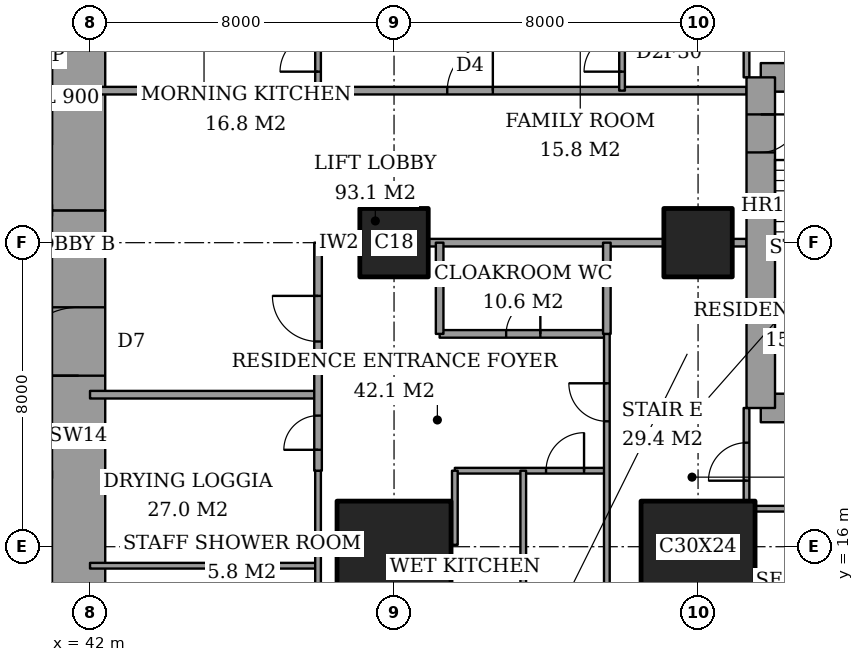
"""IFC4 building model, lengths in metres.
Left out: names, types, materials, properties, quantities, classifications, styles, units other than length and angle.
Written with IfcOpenShell. Run it as: python <this file> out.ifc"""

import sys

from ifc_helpers import new_model, si_unit, direction, frame, frame_2d, origin, origin_2d, place, context, subcontext, project, spatial, rectangle, extrude, element, fill, save


model = new_model("IFC4")
c1 = context("Model", 3, precision=1e-05, world=origin(), true_north=direction((0.0, 1.0)))
c2 = subcontext(c1, "Body", "Model", "MODEL_VIEW")
j1 = project(units=[si_unit("LENGTHUNIT", "METRE"), si_unit("PLANEANGLEUNIT", "RADIAN")], contexts=[c1])
p1 = place(None, origin())
s1 = spatial("IfcSite", under=j1, at=p1, CompositionType="ELEMENT")
p2 = place(p1, origin())
s2 = spatial("IfcBuilding", under=s1, at=p2, CompositionType="ELEMENT")
p3 = place(p2, frame((0.0, 0.0, 203.8)))
s3 = spatial("IfcBuildingStorey", under=s2, at=p3, CompositionType="ELEMENT", Elevation=203.8)
p4 = place(p3, frame((50.0, 16.0, 0.0), z_axis=(0.0, 0.0, 1.0), x_axis=(1.0, 0.0, 0.0)))
e1 = element("IfcColumn", 1, at=p4, inside=s3, PredefinedType="COLUMN", context=c2, shape_type="SweptSolid", body=[
    extrude(rectangle(XDim=3.0, YDim=2.4, at=origin_2d()), origin(), (0.0, 0.0, 1.0), 3.6),
])
p5 = place(p3, frame((50.0, 24.0, 0.0), z_axis=(0.0, 0.0, 1.0), x_axis=(1.0, 0.0, 0.0)))
e2 = element("IfcColumn", 2, at=p5, inside=s3, PredefinedType="COLUMN", context=c2, shape_type="SweptSolid", body=[
    extrude(rectangle(XDim=1.8, YDim=1.8, at=origin_2d()), origin(), (0.0, 0.0, 1.0), 3.6),
])
p6 = place(p3, frame((58.0, 16.0, 0.0), z_axis=(0.0, 0.0, 1.0), x_axis=(1.0, 0.0, 0.0)))
e3 = element("IfcColumn", 3, at=p6, inside=s3, PredefinedType="COLUMN", context=c2, shape_type="SweptSolid", body=[
    extrude(rectangle(XDim=3.0, YDim=2.4, at=origin_2d()), origin(), (0.0, 0.0, 1.0), 3.6),
])
p7 = place(p3, frame((58.0, 24.0, 0.0), z_axis=(0.0, 0.0, 1.0), x_axis=(1.0, 0.0, 0.0)))
e4 = element("IfcColumn", 4, at=p7, inside=s3, PredefinedType="COLUMN", context=c2, shape_type="SweptSolid", body=[
    extrude(rectangle(XDim=1.8, YDim=1.8, at=origin_2d()), origin(), (0.0, 0.0, 1.0), 3.6),
])
p8 = place(p3, frame((41.7, 13.0, 0.0), z_axis=(0.0, 0.0, 1.0), x_axis=(0.0, 1.0, 0.0)))
e5 = element("IfcWall", 5, at=p8, inside=s3, PredefinedType="SHEAR", context=c2, shape_type="SweptSolid", body=[
    extrude(rectangle(XDim=11.85, YDim=1.4, at=frame_2d((5.925, 0.0))), origin(), (0.0, 0.0, 1.0), 3.6),
])
p9 = place(p8, frame((7.5, 0.0, 0.0)))
e6 = element("IfcOpeningElement", 6, at=p9, cuts=e5, PredefinedType="OPENING", context=c2, shape_type="SweptSolid", body=[
    extrude(rectangle(XDim=1.8, YDim=2.4, at=frame_2d((0.9, 1.2))), frame((0.0, 0.71, 0.0), z_axis=(0.0, -1.0, 0.0), x_axis=(1.0, 0.0, 0.0)), (0.0, 0.0, 1.0), 1.42),
])
p10 = place(p3, frame((41.7, 24.85, 0.0), z_axis=(0.0, 0.0, 1.0), x_axis=(0.0, 1.0, 0.0)))
e7 = element("IfcWall", 7, at=p10, inside=s3, PredefinedType="SHEAR", context=c2, shape_type="SweptSolid", body=[
    extrude(rectangle(XDim=10.15, YDim=1.4, at=frame_2d((5.075, 0.0))), origin(), (0.0, 0.0, 1.0), 3.6),
])
for number, where, z_axis, x_axis in (
    (8, (59.65, 19.65, 0.0), (0.0, 0.0, 1.0), (1.0, 0.0, 0.0)),
    (9, (64.1, 28.35, 0.0), (0.0, 0.0, 1.0), (-1.0, 0.0, 0.0)),
):
    element("IfcWall", number, at=place(p3, frame(where, z_axis=z_axis, x_axis=x_axis)), inside=s3, PredefinedType="SHEAR", context=c2, shape_type="SweptSolid", body=[
        extrude(rectangle(XDim=4.45, YDim=0.75, at=frame_2d((2.225, 0.0))), origin(), (0.0, 0.0, 1.0), 3.6),
    ])
p11 = place(p3, frame((59.65, 28.35, 0.0), z_axis=(0.0, 0.0, 1.0), x_axis=(0.0, -1.0, 0.0)))
e10 = element("IfcWall", 10, at=p11, inside=s3, PredefinedType="SHEAR", context=c2, shape_type="SweptSolid", body=[
    extrude(rectangle(XDim=8.7, YDim=0.75, at=frame_2d((4.35, 0.0))), origin(), (0.0, 0.0, 1.0), 3.6),
])
p12 = place(p11, frame((0.975, 0.0, 0.0)))
e11 = element("IfcOpeningElement", 11, at=p12, cuts=e10, PredefinedType="OPENING", context=c2, shape_type="SweptSolid", body=[
    extrude(rectangle(XDim=1.0, YDim=2.1, at=frame_2d((0.5, 1.05))), frame((0.0, 0.385, 0.0), z_axis=(0.0, -1.0, 0.0), x_axis=(1.0, 0.0, 0.0)), (0.0, 0.0, 1.0), 0.77),
])
p13 = place(p3, frame((42.0, 15.5, 0.0), z_axis=(0.0, 0.0, 1.0), x_axis=(1.0, 0.0, 0.0)))
e12 = element("IfcWall", 12, at=p13, inside=s3, PredefinedType="PARTITIONING", context=c2, shape_type="SweptSolid", body=[
    extrude(rectangle(XDim=6.0, YDim=0.15, at=frame_2d((3.0, 0.0))), origin(), (0.0, 0.0, 1.0), 3.35),
])
p14 = place(p3, frame((48.0, 16.05, 0.0), z_axis=(0.0, 0.0, 1.0), x_axis=(1.0, 0.0, 0.0)))
e13 = element("IfcWall", 13, at=p14, inside=s3, PredefinedType="PARTITIONING", context=c2, shape_type="SweptSolid", body=[
    extrude(rectangle(XDim=0.5, YDim=0.15, at=frame_2d((0.25, 0.0))), origin(), (0.0, 0.0, 1.0), 2.634),
])
p15 = place(p3, frame((59.5, 17.0, 0.0), z_axis=(0.0, 0.0, 1.0), x_axis=(1.0, 0.0, 0.0)))
e14 = element("IfcWall", 14, at=p15, inside=s3, PredefinedType="PARTITIONING", context=c2, shape_type="SweptSolid", body=[
    extrude(rectangle(XDim=6.95, YDim=0.15, at=frame_2d((3.475, 0.0))), origin(), (0.0, 0.0, 1.0), 3.35),
])
p16 = place(p3, frame((51.6, 18.0, 0.0), z_axis=(0.0, 0.0, 1.0), x_axis=(1.0, 0.0, 0.0)))
e15 = element("IfcWall", 15, at=p16, inside=s3, PredefinedType="PARTITIONING", context=c2, shape_type="SweptSolid", body=[
    extrude(rectangle(XDim=4.0, YDim=0.15, at=frame_2d((2.0, 0.0))), origin(), (0.0, 0.0, 1.0), 3.35),
])
p17 = place(p16, frame((2.4, 0.0, 0.0)))
e16 = element("IfcOpeningElement", 16, at=p17, cuts=e15, PredefinedType="OPENING", context=c2, shape_type="SweptSolid", body=[
    extrude(rectangle(XDim=1.0, YDim=2.1, at=frame_2d((0.5, 1.05))), frame((0.0, 0.085, 0.0), z_axis=(0.0, -1.0, 0.0), x_axis=(1.0, 0.0, 0.0)), (0.0, 0.0, 1.0), 0.17),
])
p18 = place(p3, frame((42.0, 20.0, 0.0), z_axis=(0.0, 0.0, 1.0), x_axis=(1.0, 0.0, 0.0)))
e17 = element("IfcWall", 17, at=p18, inside=s3, PredefinedType="PARTITIONING", context=c2, shape_type="SweptSolid", body=[
    extrude(rectangle(XDim=6.0, YDim=0.2, at=frame_2d((3.0, 0.0))), origin(), (0.0, 0.0, 1.0), 3.35),
])
p19 = place(p3, frame((51.2, 21.6, 0.0), z_axis=(0.0, 0.0, 1.0), x_axis=(1.0, 0.0, 0.0)))
e18 = element("IfcWall", 18, at=p19, inside=s3, PredefinedType="PARTITIONING", context=c2, shape_type="SweptSolid", body=[
    extrude(rectangle(XDim=4.4, YDim=0.2, at=frame_2d((2.2, 0.0))), origin(), (0.0, 0.0, 1.0), 3.35),
])
p20 = place(p19, frame((1.75, 0.0, 0.0)))
e19 = element("IfcOpeningElement", 19, at=p20, cuts=e18, PredefinedType="OPENING", context=c2, shape_type="SweptSolid", body=[
    extrude(rectangle(XDim=0.9, YDim=2.1, at=frame_2d((0.45, 1.05))), frame((0.0, 0.11, 0.0), z_axis=(0.0, -1.0, 0.0), x_axis=(1.0, 0.0, 0.0)), (0.0, 0.0, 1.0), 0.22),
])
p21 = place(p3, frame((48.0, 24.0, 0.0), z_axis=(0.0, 0.0, 1.0), x_axis=(1.0, 0.0, 0.0)))
e20 = element("IfcWall", 20, at=p21, inside=s3, PredefinedType="PARTITIONING", context=c2, shape_type="SweptSolid", body=[
    extrude(rectangle(XDim=1.1, YDim=0.2, at=frame_2d((0.55, 0.0))), origin(), (0.0, 0.0, 1.0), 3.35),
])
p22 = place(p3, frame((50.9, 24.0, 0.0), z_axis=(0.0, 0.0, 1.0), x_axis=(1.0, 0.0, 0.0)))
e21 = element("IfcWall", 21, at=p22, inside=s3, PredefinedType="PARTITIONING", context=c2, shape_type="SweptSolid", body=[
    extrude(rectangle(XDim=6.2, YDim=0.2, at=frame_2d((3.1, 0.0))), origin(), (0.0, 0.0, 1.0), 3.35),
])
p23 = place(p3, frame((58.9, 24.0, 0.0), z_axis=(0.0, 0.0, 1.0), x_axis=(1.0, 0.0, 0.0)))
e22 = element("IfcWall", 22, at=p23, inside=s3, PredefinedType="PARTITIONING", context=c2, shape_type="SweptSolid", body=[
    extrude(rectangle(XDim=0.375, YDim=0.2, at=frame_2d((0.188, 0.0))), origin(), (0.0, 0.0, 1.0), 3.35),
])
p24 = place(p3, frame((42.0, 28.0, 0.0), z_axis=(0.0, 0.0, 1.0), x_axis=(1.0, 0.0, 0.0)))
e23 = element("IfcWall", 23, at=p24, inside=s3, PredefinedType="PARTITIONING", context=c2, shape_type="SweptSolid", body=[
    extrude(rectangle(XDim=17.275, YDim=0.2, at=frame_2d((8.637, 0.0))), origin(), (0.0, 0.0, 1.0), 3.35),
])
p25 = place(p24, frame((9.4, 0.0, 0.0)))
e24 = element("IfcOpeningElement", 24, at=p25, cuts=e23, PredefinedType="OPENING", context=c2, shape_type="SweptSolid", body=[
    extrude(rectangle(XDim=1.2, YDim=2.4, at=frame_2d((0.6, 1.2))), frame((0.0, 0.11, 0.0), z_axis=(0.0, -1.0, 0.0), x_axis=(1.0, 0.0, 0.0)), (0.0, 0.0, 1.0), 0.22),
])
p26 = place(p3, frame((45.6, 13.1, 0.0), z_axis=(0.0, 0.0, 1.0), x_axis=(0.0, 1.0, 0.0)))
e25 = element("IfcWall", 25, at=p26, inside=s3, PredefinedType="PARTITIONING", context=c2, shape_type="SweptSolid", body=[
    extrude(rectangle(XDim=2.4, YDim=0.15, at=frame_2d((1.2, 0.0))), origin(), (0.0, 0.0, 1.0), 3.35),
])
p27 = place(p26, frame((0.75, 0.0, 0.0)))
e26 = element("IfcOpeningElement", 26, at=p27, cuts=e25, PredefinedType="OPENING", context=c2, shape_type="SweptSolid", body=[
    extrude(rectangle(XDim=0.9, YDim=2.1, at=frame_2d((0.45, 1.05))), frame((0.0, 0.085, 0.0), z_axis=(0.0, -1.0, 0.0), x_axis=(1.0, 0.0, 0.0)), (0.0, 0.0, 1.0), 0.17),
])
p28 = place(p3, frame((48.0, 18.0, 0.0), z_axis=(0.0, 0.0, 1.0), x_axis=(0.0, 1.0, 0.0)))
e27 = element("IfcWall", 27, at=p28, inside=s3, PredefinedType="PARTITIONING", context=c2, shape_type="SweptSolid", body=[
    extrude(rectangle(XDim=6.0, YDim=0.2, at=frame_2d((3.0, 0.0))), origin(), (0.0, 0.0, 1.0), 3.35),
])
p29 = place(p28, frame((3.4, 0.0, 0.0)))
e28 = element("IfcOpeningElement", 28, at=p29, cuts=e27, PredefinedType="OPENING", context=c2, shape_type="SweptSolid", body=[
    extrude(rectangle(XDim=1.2, YDim=2.4, at=frame_2d((0.6, 1.2))), frame((0.0, 0.11, 0.0), z_axis=(0.0, -1.0, 0.0), x_axis=(1.0, 0.0, 0.0)), (0.0, 0.0, 1.0), 0.22),
])
p30 = place(p28, frame((0.55, 0.0, 0.0)))
e29 = element("IfcOpeningElement", 29, at=p30, cuts=e27, PredefinedType="OPENING", context=c2, shape_type="SweptSolid", body=[
    extrude(rectangle(XDim=0.9, YDim=2.1, at=frame_2d((0.45, 1.05))), frame((0.0, 0.11, 0.0), z_axis=(0.0, -1.0, 0.0), x_axis=(1.0, 0.0, 0.0)), (0.0, 0.0, 1.0), 0.22),
])
p31 = place(p3, frame((48.0, 11.2, 0.0), z_axis=(0.0, 0.0, 1.0), x_axis=(0.0, 1.0, 0.0)))
e30 = element("IfcWall", 30, at=p31, inside=s3, PredefinedType="PARTITIONING", context=c2, shape_type="SweptSolid", body=[
    extrude(rectangle(XDim=6.8, YDim=0.15, at=frame_2d((3.4, 0.0))), origin(), (0.0, 0.0, 1.0), 3.35),
])
p32 = place(p3, frame((48.0, 28.0, 0.0), z_axis=(0.0, 0.0, 1.0), x_axis=(0.0, 1.0, 0.0)))
e31 = element("IfcWall", 31, at=p32, inside=s3, PredefinedType="PARTITIONING", context=c2, shape_type="SweptSolid", body=[
    extrude(rectangle(XDim=9.2, YDim=0.15, at=frame_2d((4.6, 0.0))), origin(), (0.0, 0.0, 1.0), 3.35),
])
p33 = place(p32, frame((0.5, 0.0, 0.0)))
e32 = element("IfcOpeningElement", 32, at=p33, cuts=e31, PredefinedType="OPENING", context=c2, shape_type="SweptSolid", body=[
    extrude(rectangle(XDim=1.0, YDim=2.1, at=frame_2d((0.5, 1.05))), frame((0.0, 0.085, 0.0), z_axis=(0.0, -1.0, 0.0), x_axis=(1.0, 0.0, 0.0)), (0.0, 0.0, 1.0), 0.17),
])
p34 = place(p3, frame((51.2, 21.6, 0.0), z_axis=(0.0, 0.0, 1.0), x_axis=(0.0, 1.0, 0.0)))
e33 = element("IfcWall", 33, at=p34, inside=s3, PredefinedType="PARTITIONING", context=c2, shape_type="SweptSolid", body=[
    extrude(rectangle(XDim=2.4, YDim=0.2, at=frame_2d((1.2, 0.0))), origin(), (0.0, 0.0, 1.0), 3.35),
])
p35 = place(p3, frame((51.6, 16.05, 0.0), z_axis=(0.0, 0.0, 1.0), x_axis=(0.0, 1.0, 0.0)))
e34 = element("IfcWall", 34, at=p35, inside=s3, PredefinedType="PARTITIONING", context=c2, shape_type="SweptSolid", body=[
    extrude(rectangle(XDim=1.95, YDim=0.15, at=frame_2d((0.975, 0.0))), origin(), (0.0, 0.0, 1.0), 3.35),
])
p36 = place(p3, frame((53.4, 11.2, 0.0), z_axis=(0.0, 0.0, 1.0), x_axis=(0.0, 1.0, 0.0)))
e35 = element("IfcWall", 35, at=p36, inside=s3, PredefinedType="PARTITIONING", context=c2, shape_type="SweptSolid", body=[
    extrude(rectangle(XDim=6.8, YDim=0.15, at=frame_2d((3.4, 0.0))), origin(), (0.0, 0.0, 1.0), 3.35),
])
p37 = place(p3, frame((55.6, 21.6, 0.0), z_axis=(0.0, 0.0, 1.0), x_axis=(0.0, 1.0, 0.0)))
e36 = element("IfcWall", 36, at=p37, inside=s3, PredefinedType="PARTITIONING", context=c2, shape_type="SweptSolid", body=[
    extrude(rectangle(XDim=2.4, YDim=0.2, at=frame_2d((1.2, 0.0))), origin(), (0.0, 0.0, 1.0), 3.35),
])
p38 = place(p3, frame((55.6, 14.6, 0.0), z_axis=(0.0, 0.0, 1.0), x_axis=(0.0, 1.0, 0.0)))
e37 = element("IfcWall", 37, at=p38, inside=s3, PredefinedType="PARTITIONING", context=c2, shape_type="SweptSolid", body=[
    extrude(rectangle(XDim=7.0, YDim=0.15, at=frame_2d((3.5, 0.0))), origin(), (0.0, 0.0, 1.0), 3.35),
])
p39 = place(p38, frame((4.7, 0.0, 0.0)))
e38 = element("IfcOpeningElement", 38, at=p39, cuts=e37, PredefinedType="OPENING", context=c2, shape_type="SweptSolid", body=[
    extrude(rectangle(XDim=1.0, YDim=2.1, at=frame_2d((0.5, 1.05))), frame((0.0, 0.085, 0.0), z_axis=(0.0, -1.0, 0.0), x_axis=(1.0, 0.0, 0.0)), (0.0, 0.0, 1.0), 0.17),
])
p40 = place(p3, frame((56.0, 28.0, 0.0), z_axis=(0.0, 0.0, 1.0), x_axis=(0.0, 1.0, 0.0)))
e39 = element("IfcWall", 39, at=p40, inside=s3, PredefinedType="PARTITIONING", context=c2, shape_type="SweptSolid", body=[
    extrude(rectangle(XDim=9.2, YDim=0.15, at=frame_2d((4.6, 0.0))), origin(), (0.0, 0.0, 1.0), 3.35),
])
p41 = place(p40, frame((0.5, 0.0, 0.0)))
e40 = element("IfcOpeningElement", 40, at=p41, cuts=e39, PredefinedType="OPENING", context=c2, shape_type="SweptSolid", body=[
    extrude(rectangle(XDim=1.0, YDim=2.1, at=frame_2d((0.5, 1.05))), frame((0.0, 0.085, 0.0), z_axis=(0.0, -1.0, 0.0), x_axis=(1.0, 0.0, 0.0)), (0.0, 0.0, 1.0), 0.17),
])
p42 = place(p3, frame((59.275, 17.2, 0.0), z_axis=(0.0, 0.0, 1.0), x_axis=(0.0, 1.0, 0.0)))
e41 = element("IfcWall", 41, at=p42, inside=s3, PredefinedType="PARTITIONING", context=c2, shape_type="SweptSolid", body=[
    extrude(rectangle(XDim=2.45, YDim=0.15, at=frame_2d((1.225, 0.0))), origin(), (0.0, 0.0, 1.0), 3.35),
])
p43 = place(p42, frame((0.538, 0.0, 0.0)))
e42 = element("IfcOpeningElement", 42, at=p43, cuts=e41, PredefinedType="OPENING", context=c2, shape_type="SweptSolid", body=[
    extrude(rectangle(XDim=1.0, YDim=2.1, at=frame_2d((0.5, 1.05))), frame((0.0, 0.085, 0.0), z_axis=(0.0, -1.0, 0.0), x_axis=(1.0, 0.0, 0.0)), (0.0, 0.0, 1.0), 0.17),
])
p44 = place(p3, frame((59.275, 28.35, 0.0), z_axis=(0.0, 0.0, 1.0), x_axis=(0.0, 1.0, 0.0)))
e43 = element("IfcWall", 43, at=p44, inside=s3, PredefinedType="PARTITIONING", context=c2, shape_type="SweptSolid", body=[
    extrude(rectangle(XDim=2.45, YDim=0.15, at=frame_2d((1.225, 0.0))), origin(), (0.0, 0.0, 1.0), 3.35),
])
p45 = place(p44, frame((0.913, 0.0, 0.0)))
e44 = element("IfcOpeningElement", 44, at=p45, cuts=e43, PredefinedType="OPENING", context=c2, shape_type="SweptSolid", body=[
    extrude(rectangle(XDim=1.0, YDim=2.1, at=frame_2d((0.5, 1.05))), frame((0.0, 0.085, 0.0), z_axis=(0.0, -1.0, 0.0), x_axis=(1.0, 0.0, 0.0)), (0.0, 0.0, 1.0), 0.17),
])
p46 = place(p3, frame((28.3, 17.9, 0.0), z_axis=(0.0, 0.0, 1.0), x_axis=(1.0, 0.0, 0.0)))
e45 = element("IfcWall", 45, at=p46, inside=s3, PredefinedType="PARTITIONING", context=c2, shape_type="SweptSolid", body=[
    extrude(rectangle(XDim=12.7, YDim=0.2, at=frame_2d((6.35, 0.0))), origin(), (0.0, 0.0, 1.0), 3.6),
])
p47 = place(p46, frame((1.0, 0.0, 0.0)))
e46 = element("IfcOpeningElement", 46, at=p47, cuts=e45, PredefinedType="OPENING", context=c2, shape_type="SweptSolid", body=[
    extrude(rectangle(XDim=1.0, YDim=2.1, at=frame_2d((0.5, 1.05))), frame((0.0, 0.11, 0.0), z_axis=(0.0, -1.0, 0.0), x_axis=(1.0, 0.0, 0.0)), (0.0, 0.0, 1.0), 0.22),
])
p48 = place(p46, frame((7.45, 0.0, 0.0)))
e47 = element("IfcOpeningElement", 47, at=p48, cuts=e45, PredefinedType="OPENING", context=c2, shape_type="SweptSolid", body=[
    extrude(rectangle(XDim=0.9, YDim=2.1, at=frame_2d((0.45, 1.05))), frame((0.0, 0.11, 0.0), z_axis=(0.0, -1.0, 0.0), x_axis=(1.0, 0.0, 0.0)), (0.0, 0.0, 1.0), 0.22),
])
p49 = place(p46, frame((10.6, 0.0, 0.0)))
e48 = element("IfcOpeningElement", 48, at=p49, cuts=e45, PredefinedType="OPENING", context=c2, shape_type="SweptSolid", body=[
    extrude(rectangle(XDim=1.2, YDim=2.1, at=frame_2d((0.6, 1.05))), frame((0.0, 0.11, 0.0), z_axis=(0.0, -1.0, 0.0), x_axis=(1.0, 0.0, 0.0)), (0.0, 0.0, 1.0), 0.22),
])
p50 = place(p43, origin())
e49 = element("IfcDoor", 49, at=p50, inside=s3, OperationType="SINGLE_SWING_RIGHT", PredefinedType="DOOR", context=c2, shape_type="SweptSolid", body=[
    extrude(rectangle(XDim=1.0, YDim=2.1, at=frame_2d((0.5, 1.05))), frame((0.0, 0.025, 0.0), z_axis=(0.0, -1.0, 0.0), x_axis=(1.0, 0.0, 0.0)), (0.0, 0.0, 1.0), 0.05),
])
fill(e42, e49)
p51 = place(p39, origin())
e50 = element("IfcDoor", 50, at=p51, inside=s3, OperationType="SINGLE_SWING_LEFT", PredefinedType="DOOR", context=c2, shape_type="SweptSolid", body=[
    extrude(rectangle(XDim=1.0, YDim=2.1, at=frame_2d((0.5, 1.05))), frame((0.0, 0.025, 0.0), z_axis=(0.0, -1.0, 0.0), x_axis=(1.0, 0.0, 0.0)), (0.0, 0.0, 1.0), 0.05),
])
fill(e38, e50)
p52 = place(p20, origin())
e51 = element("IfcDoor", 51, at=p52, inside=s3, OperationType="SINGLE_SWING_LEFT", PredefinedType="DOOR", context=c2, shape_type="SweptSolid", body=[
    extrude(rectangle(XDim=0.9, YDim=2.1, at=frame_2d((0.45, 1.05))), frame((0.0, 0.025, 0.0), z_axis=(0.0, -1.0, 0.0), x_axis=(1.0, 0.0, 0.0)), (0.0, 0.0, 1.0), 0.05),
])
fill(e19, e51)
p53 = place(p29, origin())
e52 = element("IfcDoor", 52, at=p53, inside=s3, OperationType="SINGLE_SWING_LEFT", PredefinedType="DOOR", context=c2, shape_type="SweptSolid", body=[
    extrude(rectangle(XDim=1.2, YDim=2.4, at=frame_2d((0.6, 1.2))), frame((0.0, 0.025, 0.0), z_axis=(0.0, -1.0, 0.0), x_axis=(1.0, 0.0, 0.0)), (0.0, 0.0, 1.0), 0.05),
])
fill(e28, e52)
p54 = place(p17, origin())
e53 = element("IfcDoor", 53, at=p54, inside=s3, OperationType="SINGLE_SWING_LEFT", PredefinedType="DOOR", context=c2, shape_type="SweptSolid", body=[
    extrude(rectangle(XDim=1.0, YDim=2.1, at=frame_2d((0.5, 1.05))), frame((0.0, 0.025, 0.0), z_axis=(0.0, -1.0, 0.0), x_axis=(1.0, 0.0, 0.0)), (0.0, 0.0, 1.0), 0.05),
])
fill(e16, e53)
p55 = place(p30, origin())
e54 = element("IfcDoor", 54, at=p55, inside=s3, OperationType="SINGLE_SWING_RIGHT", PredefinedType="DOOR", context=c2, shape_type="SweptSolid", body=[
    extrude(rectangle(XDim=0.9, YDim=2.1, at=frame_2d((0.45, 1.05))), frame((0.0, 0.025, 0.0), z_axis=(0.0, -1.0, 0.0), x_axis=(1.0, 0.0, 0.0)), (0.0, 0.0, 1.0), 0.05),
])
fill(e29, e54)
p56 = place(p41, origin())
e55 = element("IfcDoor", 55, at=p56, inside=s3, OperationType="SINGLE_SWING_RIGHT", PredefinedType="DOOR", context=c2, shape_type="SweptSolid", body=[
    extrude(rectangle(XDim=1.0, YDim=2.1, at=frame_2d((0.5, 1.05))), frame((0.0, 0.025, 0.0), z_axis=(0.0, -1.0, 0.0), x_axis=(1.0, 0.0, 0.0)), (0.0, 0.0, 1.0), 0.05),
])
fill(e40, e55)
p57 = place(p25, origin())
e56 = element("IfcDoor", 56, at=p57, inside=s3, OperationType="SINGLE_SWING_LEFT", PredefinedType="DOOR", context=c2, shape_type="SweptSolid", body=[
    extrude(rectangle(XDim=1.2, YDim=2.4, at=frame_2d((0.6, 1.2))), frame((0.0, 0.025, 0.0), z_axis=(0.0, -1.0, 0.0), x_axis=(1.0, 0.0, 0.0)), (0.0, 0.0, 1.0), 0.05),
])
fill(e24, e56)
p58 = place(p33, origin())
e57 = element("IfcDoor", 57, at=p58, inside=s3, OperationType="SINGLE_SWING_RIGHT", PredefinedType="DOOR", context=c2, shape_type="SweptSolid", body=[
    extrude(rectangle(XDim=1.0, YDim=2.1, at=frame_2d((0.5, 1.05))), frame((0.0, 0.025, 0.0), z_axis=(0.0, -1.0, 0.0), x_axis=(1.0, 0.0, 0.0)), (0.0, 0.0, 1.0), 0.05),
])
fill(e32, e57)
p59 = place(p9, origin())
e58 = element("IfcDoor", 58, at=p59, inside=s3, OperationType="DOUBLE_DOOR_DOUBLE_SWING", PredefinedType="DOOR", context=c2, shape_type="SweptSolid", body=[
    extrude(rectangle(XDim=1.8, YDim=2.4, at=frame_2d((0.9, 1.2))), frame((0.0, 0.025, 0.0), z_axis=(0.0, -1.0, 0.0), x_axis=(1.0, 0.0, 0.0)), (0.0, 0.0, 1.0), 0.05),
])
fill(e6, e58)
p60 = place(p12, origin())
e59 = element("IfcDoor", 59, at=p60, inside=s3, OperationType="SINGLE_SWING_RIGHT", PredefinedType="DOOR", context=c2, shape_type="SweptSolid", body=[
    extrude(rectangle(XDim=1.0, YDim=2.1, at=frame_2d((0.5, 1.05))), frame((0.0, 0.025, 0.0), z_axis=(0.0, -1.0, 0.0), x_axis=(1.0, 0.0, 0.0)), (0.0, 0.0, 1.0), 0.05),
])
fill(e11, e59)
save(model, sys.argv[1])
